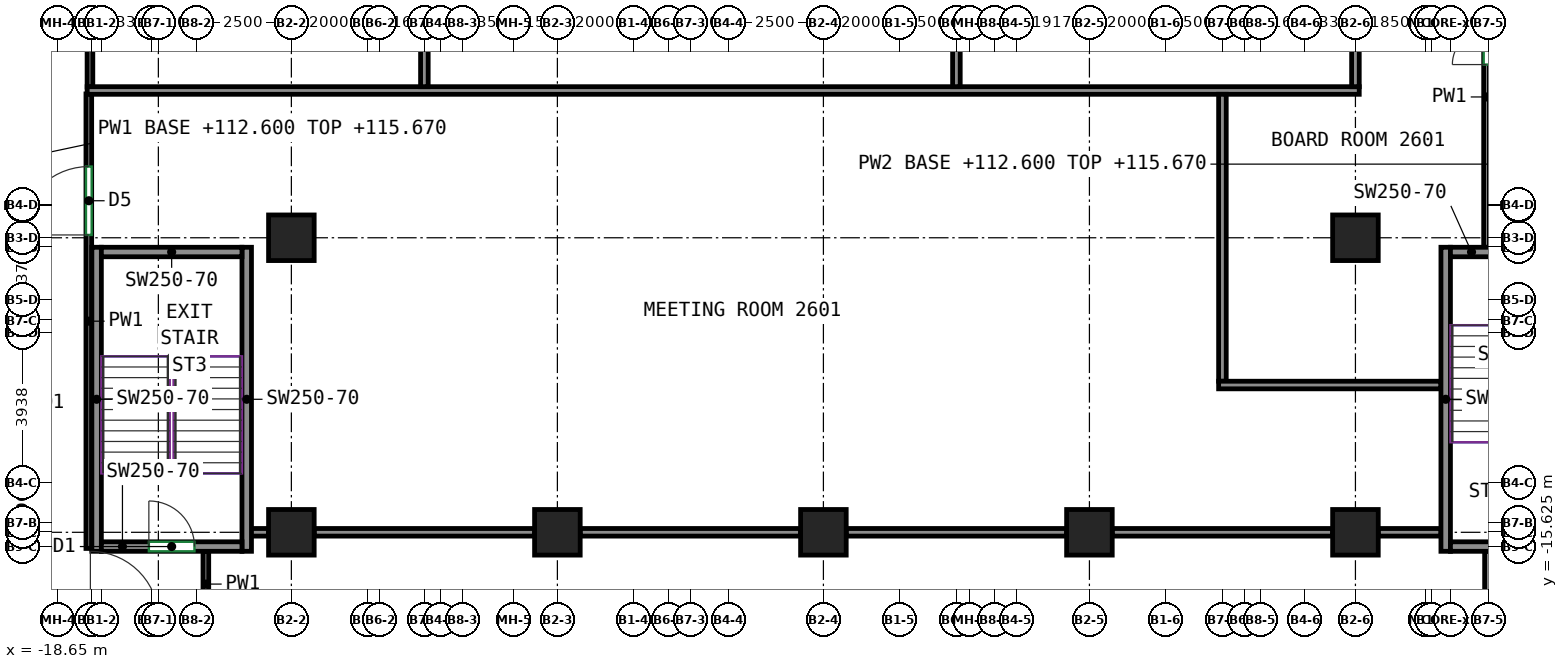
"""IFC4 building model, lengths in metres.
Left out: names, types, materials, properties, quantities, classifications, styles, units other than length and angle.
Written with IfcOpenShell. Run it as: python <this file> out.ifc"""

import sys

from ifc_helpers import new_model, si_unit, direction, frame, frame_2d, origin, origin_2d, place, context, subcontext, project, spatial, rectangle, extrude, source, transform, mapped, element, fill, save


model = new_model("IFC4")
c1 = context("Model", 3, precision=1e-05, world=origin(), true_north=direction((0.0, 1.0)))
c2 = subcontext(c1, "Body", "Model", "MODEL_VIEW")
j1 = project(units=[si_unit("LENGTHUNIT", "METRE"), si_unit("PLANEANGLEUNIT", "RADIAN")], contexts=[c1])
p1 = place(None, origin())
s1 = spatial("IfcSite", under=j1, at=p1, CompositionType="ELEMENT")
p2 = place(p1, origin())
s2 = spatial("IfcBuilding", under=s1, at=p2, CompositionType="ELEMENT")
p3 = place(p2, frame((0.0, 0.0, 112.6)))
s3 = spatial("IfcBuildingStorey", under=s2, at=p3, CompositionType="ELEMENT", Elevation=112.6)
m1 = source(origin(), c2, "Body", "SweptSolid", [
    extrude(rectangle(XDim=1.2, YDim=1.2, at=origin_2d()), origin(), (0.0, 0.0, 1.0), 3.72),
])
for number, where, z_axis, x_axis in (
    (1, (-12.5, -15.25, 0.0), (0.0, 0.0, 1.0), (1.0, 0.0, 0.0)),
    (2, (-12.5, -7.5, 0.0), (0.0, 0.0, 1.0), (1.0, 0.0, 0.0)),
    (3, (-5.5, -15.25, 0.0), (0.0, 0.0, 1.0), (1.0, 0.0, 0.0)),
    (4, (1.5, -15.25, 0.0), (0.0, 0.0, 1.0), (1.0, 0.0, 0.0)),
    (5, (8.5, -15.25, 0.0), (0.0, 0.0, 1.0), (1.0, 0.0, 0.0)),
    (6, (15.5, -15.25, 0.0), (0.0, 0.0, 1.0), (1.0, 0.0, 0.0)),
    (7, (15.5, -7.5, 0.0), (0.0, 0.0, 1.0), (1.0, 0.0, 0.0)),
):
    element("IfcColumn", number, at=place(p3, frame(where, z_axis=z_axis, x_axis=x_axis)), inside=s3, PredefinedType="COLUMN", context=c2, shape_type="MappedRepresentation", body=[
        mapped(m1, transform((0.0, 0.0, 0.0))),
    ])
m2 = source(origin(), c2, "Body", "SweptSolid", [
    extrude(rectangle(XDim=8.0, YDim=0.25, at=frame_2d((4.0, 0.0))), origin(), (0.0, 0.0, 1.0), 3.72),
])
for number, where, z_axis, x_axis in (
    (8, (-17.625, -15.75, 0.0), (0.0, 0.0, 1.0), (0.0, 1.0, 0.0)),
    (9, (-13.675, -15.75, 0.0), (0.0, 0.0, 1.0), (0.0, 1.0, 0.0)),
):
    element("IfcWall", number, at=place(p3, frame(where, z_axis=z_axis, x_axis=x_axis)), inside=s3, PredefinedType="SHEAR", context=c2, shape_type="MappedRepresentation", body=[
        mapped(m2, transform((0.0, 0.0, 0.0))),
    ])
m3 = source(origin(), c2, "Body", "SweptSolid", [
    extrude(rectangle(XDim=3.7, YDim=0.25, at=frame_2d((1.85, 0.0))), origin(), (0.0, 0.0, 1.0), 3.72),
])
p4 = place(p3, frame((-17.5, -15.625, 0.0), z_axis=(0.0, 0.0, 1.0), x_axis=(1.0, 0.0, 0.0)))
e10 = element("IfcWall", 10, at=p4, inside=s3, PredefinedType="SHEAR", context=c2, shape_type="MappedRepresentation", body=[
    mapped(m3, transform((0.0, 0.0, 0.0))),
])
p5 = place(p4, frame((1.25, 0.0, 0.0)))
e11 = element("IfcOpeningElement", 11, at=p5, cuts=e10, PredefinedType="OPENING", context=c2, shape_type="SweptSolid", body=[
    extrude(rectangle(XDim=1.2, YDim=2.1, at=frame_2d((0.6, 1.05))), frame((0.0, 0.135, 0.0), z_axis=(0.0, -1.0, 0.0), x_axis=(1.0, 0.0, 0.0)), (0.0, 0.0, 1.0), 0.27),
])
p6 = place(p3, frame((-17.5, -7.875, 0.0), z_axis=(0.0, 0.0, 1.0), x_axis=(1.0, 0.0, 0.0)))
e12 = element("IfcWall", 12, at=p6, inside=s3, PredefinedType="SHEAR", context=c2, shape_type="MappedRepresentation", body=[
    mapped(m3, transform((0.0, 0.0, 0.0))),
])
p7 = place(p3, frame((17.875, -15.75, 0.0), z_axis=(0.0, 0.0, 1.0), x_axis=(0.0, 1.0, 0.0)))
e13 = element("IfcWall", 13, at=p7, inside=s3, PredefinedType="SHEAR", context=c2, shape_type="MappedRepresentation", body=[
    mapped(m2, transform((0.0, 0.0, 0.0))),
])
p8 = place(p3, frame((18.0, -15.625, 0.0), z_axis=(0.0, 0.0, 1.0), x_axis=(1.0, 0.0, 0.0)))
e14 = element("IfcWall", 14, at=p8, inside=s3, PredefinedType="SHEAR", context=c2, shape_type="MappedRepresentation", body=[
    mapped(m3, transform((0.0, 0.0, 0.0))),
])
p9 = place(p3, frame((18.0, -7.875, 0.0), z_axis=(0.0, 0.0, 1.0), x_axis=(1.0, 0.0, 0.0)))
e15 = element("IfcWall", 15, at=p9, inside=s3, PredefinedType="SHEAR", context=c2, shape_type="MappedRepresentation", body=[
    mapped(m3, transform((0.0, 0.0, 0.0))),
])
p10 = place(p9, frame((1.25, 0.0, 0.0)))
e16 = element("IfcOpeningElement", 16, at=p10, cuts=e15, PredefinedType="OPENING", context=c2, shape_type="SweptSolid", body=[
    extrude(rectangle(XDim=1.2, YDim=2.1, at=frame_2d((0.6, 1.05))), frame((0.0, 0.135, 0.0), z_axis=(0.0, -1.0, 0.0), x_axis=(1.0, 0.0, 0.0)), (0.0, 0.0, 1.0), 0.27),
])
p11 = place(p3, frame((-17.8, -3.535, 0.0), z_axis=(0.0, 0.0, 1.0), x_axis=(0.0, 1.0, 0.0)))
e17 = element("IfcWall", 17, at=p11, inside=s3, PredefinedType="PARTITIONING", context=c2, shape_type="SweptSolid", body=[
    extrude(rectangle(XDim=7.585, YDim=0.15, at=frame_2d((3.792, 0.0))), origin(), (0.0, 0.0, 1.0), 3.72),
])
p12 = place(p11, frame((5.067, 0.0, 0.0)))
e18 = element("IfcOpeningElement", 18, at=p12, cuts=e17, PredefinedType="OPENING", context=c2, shape_type="SweptSolid", body=[
    extrude(rectangle(XDim=1.0, YDim=2.1, at=frame_2d((0.5, 1.05))), frame((0.0, 0.085, 0.0), z_axis=(0.0, -1.0, 0.0), x_axis=(1.0, 0.0, 0.0)), (0.0, 0.0, 1.0), 0.17),
])
p13 = place(p3, frame((-17.83, -15.675, 0.0), z_axis=(0.0, 0.0, 1.0), x_axis=(0.0, 1.0, 0.0)))
e19 = element("IfcWall", 19, at=p13, inside=s3, PredefinedType="PARTITIONING", context=c2, shape_type="SweptSolid", body=[
    extrude(rectangle(XDim=11.96, YDim=0.15, at=frame_2d((5.98, 0.0))), origin(), (0.0, 0.0, 1.0), 3.72),
])
p14 = place(p13, frame((8.249, 0.0, 0.0)))
e20 = element("IfcOpeningElement", 20, at=p14, cuts=e19, PredefinedType="OPENING", context=c2, shape_type="SweptSolid", body=[
    extrude(rectangle(XDim=1.8, YDim=2.1, at=frame_2d((0.9, 1.05))), frame((0.0, 0.085, 0.0), z_axis=(0.0, -1.0, 0.0), x_axis=(1.0, 0.0, 0.0)), (0.0, 0.0, 1.0), 0.17),
])
p15 = place(p3, frame((-14.75, -17.475, 0.0), z_axis=(0.0, 0.0, 1.0), x_axis=(0.0, 1.0, 0.0)))
e21 = element("IfcWall", 21, at=p15, inside=s3, PredefinedType="PARTITIONING", context=c2, shape_type="SweptSolid", body=[
    extrude(rectangle(XDim=1.725, YDim=0.15, at=frame_2d((0.863, 0.0))), origin(), (0.0, 0.0, 1.0), 3.72),
])
p16 = place(p3, frame((18.95, -7.75, 0.0), z_axis=(0.0, 0.0, 1.0), x_axis=(0.0, 1.0, 0.0)))
e22 = element("IfcWall", 22, at=p16, inside=s3, PredefinedType="PARTITIONING", context=c2, shape_type="SweptSolid", body=[
    extrude(rectangle(XDim=7.91, YDim=0.15, at=frame_2d((3.955, 0.0))), origin(), (0.0, 0.0, 1.0), 3.72),
])
p17 = place(p16, frame((4.807, 0.0, 0.0)))
e23 = element("IfcOpeningElement", 23, at=p17, cuts=e22, PredefinedType="OPENING", context=c2, shape_type="SweptSolid", body=[
    extrude(rectangle(XDim=0.9, YDim=2.1, at=frame_2d((0.45, 1.05))), frame((0.0, 0.085, 0.0), z_axis=(0.0, -1.0, 0.0), x_axis=(1.0, 0.0, 0.0)), (0.0, 0.0, 1.0), 0.17),
])
p18 = place(p3, frame((-17.874, -3.625, 0.0), z_axis=(0.0, 0.0, 1.0), x_axis=(1.0, 0.0, 0.0)))
e24 = element("IfcWall", 24, at=p18, inside=s3, PredefinedType="PARTITIONING", context=c2, shape_type="SweptSolid", body=[
    extrude(rectangle(XDim=33.474, YDim=0.2, at=frame_2d((16.737, 0.0))), origin(), (0.0, 0.0, 1.0), 3.72),
])
p19 = place(p3, frame((-9.0, -3.525, 0.0), z_axis=(0.0, 0.0, 1.0), x_axis=(0.0, 1.0, 0.0)))
e25 = element("IfcWall", 25, at=p19, inside=s3, PredefinedType="PARTITIONING", context=c2, shape_type="SweptSolid", body=[
    extrude(rectangle(XDim=6.399, YDim=0.2, at=frame_2d((3.199, 0.0))), origin(), (0.0, 0.0, 1.0), 3.72),
])
p20 = place(p3, frame((16.1, -15.25, 0.0), z_axis=(0.0, 0.0, 1.0), x_axis=(1.0, 0.0, 0.0)))
e26 = element("IfcWall", 26, at=p20, inside=s3, PredefinedType="PARTITIONING", context=c2, shape_type="SweptSolid", body=[
    extrude(rectangle(XDim=1.65, YDim=0.2, at=frame_2d((0.825, 0.0))), origin(), (0.0, 0.0, 1.0), 3.72),
])
for number, where, z_axis, x_axis in (
    (27, (9.1, -15.25, 0.0), (0.0, 0.0, 1.0), (1.0, 0.0, 0.0)),
    (28, (2.1, -15.25, 0.0), (0.0, 0.0, 1.0), (1.0, 0.0, 0.0)),
    (29, (-4.9, -15.25, 0.0), (0.0, 0.0, 1.0), (1.0, 0.0, 0.0)),
    (30, (-11.9, -15.25, 0.0), (0.0, 0.0, 1.0), (1.0, 0.0, 0.0)),
):
    element("IfcWall", number, at=place(p3, frame(where, z_axis=z_axis, x_axis=x_axis)), inside=s3, PredefinedType="PARTITIONING", context=c2, shape_type="SweptSolid", body=[
        extrude(rectangle(XDim=5.8, YDim=0.2, at=frame_2d((2.9, 0.0))), origin(), (0.0, 0.0, 1.0), 3.72),
    ])
p21 = place(p3, frame((-13.6, -15.25, 0.0), z_axis=(0.0, 0.0, 1.0), x_axis=(1.0, 0.0, 0.0)))
e31 = element("IfcWall", 31, at=p21, inside=s3, PredefinedType="PARTITIONING", context=c2, shape_type="SweptSolid", body=[
    extrude(rectangle(XDim=0.5, YDim=0.2, at=frame_2d((0.25, 0.0))), origin(), (0.0, 0.0, 1.0), 3.72),
])
p22 = place(p3, frame((12.0, -11.275, 0.0), z_axis=(0.0, 0.0, 1.0), x_axis=(0.0, 1.0, 0.0)))
e32 = element("IfcWall", 32, at=p22, inside=s3, PredefinedType="PARTITIONING", context=c2, shape_type="SweptSolid", body=[
    extrude(rectangle(XDim=7.55, YDim=0.2, at=frame_2d((3.775, 0.0))), origin(), (0.0, 0.0, 1.0), 3.72),
])
p23 = place(p3, frame((11.9, -11.375, 0.0), z_axis=(0.0, 0.0, 1.0), x_axis=(1.0, 0.0, 0.0)))
e33 = element("IfcWall", 33, at=p23, inside=s3, PredefinedType="PARTITIONING", context=c2, shape_type="SweptSolid", body=[
    extrude(rectangle(XDim=5.85, YDim=0.2, at=frame_2d((2.925, 0.0))), origin(), (0.0, 0.0, 1.0), 3.72),
])
p24 = place(p3, frame((19.0, -22.75, 0.0), z_axis=(0.0, 0.0, 1.0), x_axis=(0.0, 1.0, 0.0)))
e34 = element("IfcWall", 34, at=p24, inside=s3, PredefinedType="PARTITIONING", context=c2, shape_type="SweptSolid", body=[
    extrude(rectangle(XDim=7.0, YDim=0.2, at=frame_2d((3.5, 0.0))), origin(), (0.0, 0.0, 1.0), 3.72),
])
p25 = place(p3, frame((5.0, -3.525, 0.0), z_axis=(0.0, 0.0, 1.0), x_axis=(0.0, 1.0, 0.0)))
e35 = element("IfcWall", 35, at=p25, inside=s3, PredefinedType="PARTITIONING", context=c2, shape_type="SweptSolid", body=[
    extrude(rectangle(XDim=3.675, YDim=0.2, at=frame_2d((1.837, 0.0))), origin(), (0.0, 0.0, 1.0), 3.72),
])
p26 = place(p3, frame((15.5, -3.525, 0.0), z_axis=(0.0, 0.0, 1.0), x_axis=(0.0, 1.0, 0.0)))
e36 = element("IfcWall", 36, at=p26, inside=s3, PredefinedType="PARTITIONING", context=c2, shape_type="SweptSolid", body=[
    extrude(rectangle(XDim=3.175, YDim=0.2, at=frame_2d((1.587, 0.0))), origin(), (0.0, 0.0, 1.0), 3.72),
])
p27 = place(p5, origin())
e37 = element("IfcDoor", 37, at=p27, inside=s3, OperationType="DOUBLE_DOOR_SINGLE_SWING", PredefinedType="DOOR", context=c2, shape_type="SweptSolid", body=[
    extrude(rectangle(XDim=1.2, YDim=2.1, at=frame_2d((0.6, 1.05))), frame((0.0, 0.025, 0.0), z_axis=(0.0, -1.0, 0.0), x_axis=(1.0, 0.0, 0.0)), (0.0, 0.0, 1.0), 0.05),
])
fill(e11, e37)
p28 = place(p14, origin())
e38 = element("IfcDoor", 38, at=p28, inside=s3, OperationType="DOUBLE_DOOR_SINGLE_SWING", PredefinedType="DOOR", context=c2, shape_type="SweptSolid", body=[
    extrude(rectangle(XDim=1.8, YDim=2.1, at=frame_2d((0.9, 1.05))), frame((0.0, 0.025, 0.0), z_axis=(0.0, -1.0, 0.0), x_axis=(1.0, 0.0, 0.0)), (0.0, 0.0, 1.0), 0.05),
])
fill(e20, e38)
p29 = place(p17, origin())
e39 = element("IfcDoor", 39, at=p29, inside=s3, OperationType="SINGLE_SWING_LEFT", PredefinedType="DOOR", context=c2, shape_type="SweptSolid", body=[
    extrude(rectangle(XDim=0.9, YDim=2.1, at=frame_2d((0.45, 1.05))), frame((0.0, 0.025, 0.0), z_axis=(0.0, -1.0, 0.0), x_axis=(1.0, 0.0, 0.0)), (0.0, 0.0, 1.0), 0.05),
])
fill(e23, e39)
save(model, sys.argv[1])
